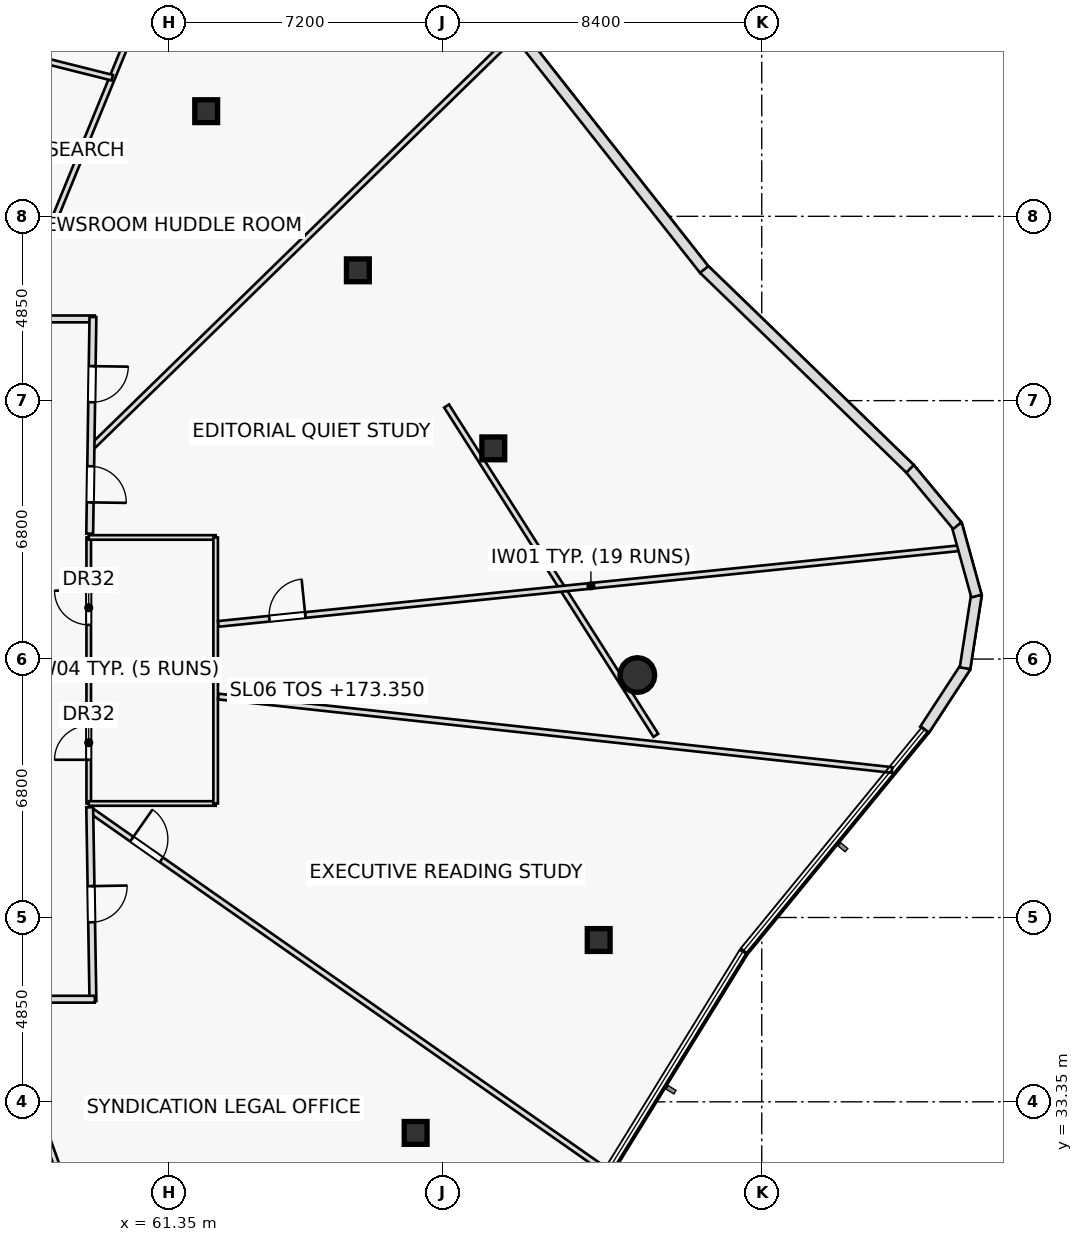
"""IFC4 building model, lengths in metres.
Left out: names, types, materials, properties, quantities, classifications, styles, units other than length and angle.
Written with IfcOpenShell. Run it as: python <this file> out.ifc"""

import sys

from ifc_helpers import new_model, si_unit, direction, frame, frame_2d, origin, origin_2d, place, context, subcontext, project, spatial, rectangle, hollow_rectangle, hollow_circle, extrude, element, fill, save


model = new_model("IFC4")
c1 = context("Model", 3, precision=1e-05, world=origin(), true_north=direction((0.0, 1.0)))
c2 = subcontext(c1, "Body", "Model", "MODEL_VIEW")
j1 = project(units=[si_unit("LENGTHUNIT", "METRE"), si_unit("PLANEANGLEUNIT", "RADIAN")], contexts=[c1])
p1 = place(None, origin())
s1 = spatial("IfcSite", under=j1, at=p1, CompositionType="ELEMENT")
p2 = place(p1, origin())
s2 = spatial("IfcBuilding", under=s1, at=p2, CompositionType="ELEMENT")
p3 = place(p2, frame((0.0, 0.0, 173.35)))
s3 = spatial("IfcBuildingStorey", under=s2, at=p3, CompositionType="ELEMENT", Elevation=173.35)
for number, where, z_axis, x_axis in (
    (1, (67.842, 32.532, 0.0), (0.0, 0.0, 1.0), (1.0, 0.0, 0.0)),
    (2, (72.659, 37.607, 0.0), (0.0, 0.0, 1.0), (1.0, 0.0, 0.0)),
):
    element("IfcColumn", number, at=place(p3, frame(where, z_axis=z_axis, x_axis=x_axis)), inside=s3, PredefinedType="COLUMN", context=c2, shape_type="SweptSolid", body=[
        extrude(hollow_rectangle(XDim=0.6, YDim=0.6, WallThickness=0.036, at=origin_2d()), origin(), (0.0, 0.0, 1.0), 3.55),
    ])
p4 = place(p3, frame((73.676, 44.58, 0.0), z_axis=(0.0, 0.0, 1.0), x_axis=(1.0, 0.0, 0.0)))
e3 = element("IfcColumn", 3, at=p4, inside=s3, PredefinedType="COLUMN", context=c2, shape_type="SweptSolid", body=[
    extrude(hollow_circle(Radius=0.457, WallThickness=0.04, at=origin_2d()), origin(), (0.0, 0.0, 1.0), 3.55),
])
for number, where, z_axis, x_axis in (
    (4, (69.886, 50.544, 0.0), (0.0, 0.0, 1.0), (1.0, 0.0, 0.0)),
    (5, (66.322, 55.229, 0.0), (0.0, 0.0, 1.0), (1.0, 0.0, 0.0)),
    (6, (62.331, 59.416, 0.0), (0.0, 0.0, 1.0), (1.0, 0.0, 0.0)),
):
    element("IfcColumn", number, at=place(p3, frame(where, z_axis=z_axis, x_axis=x_axis)), inside=s3, PredefinedType="COLUMN", context=c2, shape_type="SweptSolid", body=[
        extrude(hollow_rectangle(XDim=0.6, YDim=0.6, WallThickness=0.036, at=origin_2d()), origin(), (0.0, 0.0, 1.0), 3.55),
    ])
p5 = place(p3, frame((74.163, 42.993, 0.0), z_axis=(0.0, 0.0, 1.0), x_axis=(-0.53628142437, 0.844039237166, 0.0)))
e7 = element("IfcWall", 7, at=p5, inside=s3, PredefinedType="PARTITIONING", context=c2, shape_type="SweptSolid", body=[
    extrude(rectangle(XDim=10.267, YDim=0.15, at=frame_2d((5.133, 0.0))), origin(), (0.0, 0.0, 1.0), 2.935),
])
p6 = place(p3, frame((59.24, 41.2, 0.0), z_axis=(0.0, 0.0, 1.0), x_axis=(0.0, 1.0, 0.0)))
e8 = element("IfcWall", 8, at=p6, inside=s3, PredefinedType="PARTITIONING", context=c2, shape_type="SweptSolid", body=[
    extrude(rectangle(XDim=7.0, YDim=0.12, at=frame_2d((3.5, 0.0))), origin(), (0.0, 0.0, 1.0), 3.55),
])
p7 = place(p6, frame((1.15, 0.0, 0.0)))
e9 = element("IfcOpeningElement", 9, at=p7, cuts=e8, PredefinedType="OPENING", context=c2, shape_type="SweptSolid", body=[
    extrude(rectangle(XDim=0.9, YDim=2.05, at=frame_2d((0.45, 1.025))), frame((0.0, 0.07, 0.0), z_axis=(0.0, -1.0, 0.0), x_axis=(1.0, 0.0, 0.0)), (0.0, 0.0, 1.0), 0.14),
])
p8 = place(p6, frame((4.7, 0.0, 0.0)))
e10 = element("IfcOpeningElement", 10, at=p8, cuts=e8, PredefinedType="OPENING", context=c2, shape_type="SweptSolid", body=[
    extrude(rectangle(XDim=0.9, YDim=2.05, at=frame_2d((0.45, 1.025))), frame((0.0, 0.07, 0.0), z_axis=(0.0, -1.0, 0.0), x_axis=(1.0, 0.0, 0.0)), (0.0, 0.0, 1.0), 0.14),
])
for number, where, z_axis, x_axis in (
    (11, (59.24, 41.2, 0.0), (0.0, 0.0, 1.0), (1.0, 0.0, 0.0)),
    (12, (59.24, 44.65, 0.0), (0.0, 0.0, 1.0), (1.0, 0.0, 0.0)),
    (13, (59.24, 48.2, 0.0), (0.0, 0.0, 1.0), (1.0, 0.0, 0.0)),
):
    element("IfcWall", number, at=place(p3, frame(where, z_axis=z_axis, x_axis=x_axis)), inside=s3, PredefinedType="PARTITIONING", context=c2, shape_type="SweptSolid", body=[
        extrude(rectangle(XDim=3.34, YDim=0.12, at=frame_2d((1.67, 0.0))), origin(), (0.0, 0.0, 1.0), 3.55),
    ])
p9 = place(p3, frame((62.58, 41.2, 0.0), z_axis=(0.0, 0.0, 1.0), x_axis=(0.0, 1.0, 0.0)))
e14 = element("IfcWall", 14, at=p9, inside=s3, PredefinedType="PARTITIONING", context=c2, shape_type="SweptSolid", body=[
    extrude(rectangle(XDim=7.0, YDim=0.12, at=frame_2d((3.5, 0.0))), origin(), (0.0, 0.0, 1.0), 3.55),
])
p10 = place(p3, frame((56.824, 36.05, 0.0), z_axis=(0.0, 0.0, 1.0), x_axis=(0.338931579685, -0.940811024751, 0.0)))
e15 = element("IfcWall", 15, at=p10, inside=s3, PredefinedType="PARTITIONING", context=c2, shape_type="SweptSolid", body=[
    extrude(rectangle(XDim=13.694, YDim=0.15, at=frame_2d((6.847, 0.0))), origin(), (0.0, 0.0, 1.0), 2.935),
])
p11 = place(p3, frame((59.267, 41.037, 0.0), z_axis=(0.0, 0.0, 1.0), x_axis=(0.81945399116, -0.573144969769, 0.0)))
e16 = element("IfcWall", 16, at=p11, inside=s3, PredefinedType="PARTITIONING", context=c2, shape_type="SweptSolid", body=[
    extrude(rectangle(XDim=16.626, YDim=0.15, at=frame_2d((8.313, 0.0))), origin(), (0.0, 0.0, 1.0), 2.935),
])
p12 = place(p11, frame((1.35, 0.0, 0.0)))
e17 = element("IfcOpeningElement", 17, at=p12, cuts=e16, PredefinedType="OPENING", context=c2, shape_type="SweptSolid", body=[
    extrude(rectangle(XDim=0.95, YDim=2.05, at=frame_2d((0.475, 1.025))), frame((0.0, 0.085, 0.0), z_axis=(0.0, -1.0, 0.0), x_axis=(1.0, 0.0, 0.0)), (0.0, 0.0, 1.0), 0.17),
])
p13 = place(p3, frame((62.65, 44.014, 0.0), z_axis=(0.0, 0.0, 1.0), x_axis=(0.994111645725, -0.108360674754, 0.0)))
e18 = element("IfcWall", 18, at=p13, inside=s3, PredefinedType="PARTITIONING", context=c2, shape_type="SweptSolid", body=[
    extrude(rectangle(XDim=17.833, YDim=0.15, at=frame_2d((8.917, 0.0))), origin(), (0.0, 0.0, 1.0), 2.935),
])
p14 = place(p3, frame((62.65, 45.925, 0.0), z_axis=(0.0, 0.0, 1.0), x_axis=(0.994817894864, 0.10167278917, 0.0)))
e19 = element("IfcWall", 19, at=p14, inside=s3, PredefinedType="PARTITIONING", context=c2, shape_type="SweptSolid", body=[
    extrude(rectangle(XDim=19.712, YDim=0.15, at=frame_2d((9.856, 0.0))), origin(), (0.0, 0.0, 1.0), 3.025),
])
p15 = place(p14, frame((1.35, 0.0, 0.0)))
e20 = element("IfcOpeningElement", 20, at=p15, cuts=e19, PredefinedType="OPENING", context=c2, shape_type="SweptSolid", body=[
    extrude(rectangle(XDim=0.95, YDim=2.05, at=frame_2d((0.475, 1.025))), frame((0.0, 0.085, 0.0), z_axis=(0.0, -1.0, 0.0), x_axis=(1.0, 0.0, 0.0)), (0.0, 0.0, 1.0), 0.17),
])
p16 = place(p3, frame((59.299, 50.556, 0.0), z_axis=(0.0, 0.0, 1.0), x_axis=(0.716060673245, 0.698038044975, 0.0)))
e21 = element("IfcWall", 21, at=p16, inside=s3, PredefinedType="PARTITIONING", context=c2, shape_type="SweptSolid", body=[
    extrude(rectangle(XDim=15.673, YDim=0.15, at=frame_2d((7.836, 0.0))), origin(), (0.0, 0.0, 1.0), 2.935),
])
p17 = place(p3, frame((57.262, 53.95, 0.0), z_axis=(0.0, 0.0, 1.0), x_axis=(0.378711423927, 0.925514806682, 0.0)))
e22 = element("IfcWall", 22, at=p17, inside=s3, PredefinedType="PARTITIONING", context=c2, shape_type="SweptSolid", body=[
    extrude(rectangle(XDim=13.187, YDim=0.15, at=frame_2d((6.593, 0.0))), origin(), (0.0, 0.0, 1.0), 3.025),
])
p18 = place(p3, frame((59.859, 60.296, 0.0), z_axis=(0.0, 0.0, 1.0), x_axis=(-0.969866322162, 0.243637675935, 0.0)))
e23 = element("IfcWall", 23, at=p18, inside=s3, PredefinedType="PARTITIONING", context=c2, shape_type="SweptSolid", body=[
    extrude(rectangle(XDim=4.899, YDim=0.15, at=frame_2d((2.45, 0.0))), origin(), (0.0, 0.0, 1.0), 2.935),
])
p19 = place(p18, frame((1.975, 0.0, 0.0)))
e24 = element("IfcOpeningElement", 24, at=p19, cuts=e23, PredefinedType="OPENING", context=c2, shape_type="SweptSolid", body=[
    extrude(rectangle(XDim=0.95, YDim=2.05, at=frame_2d((0.475, 1.025))), frame((0.0, 0.085, 0.0), z_axis=(0.0, -1.0, 0.0), x_axis=(1.0, 0.0, 0.0)), (0.0, 0.0, 1.0), 0.17),
])
p20 = place(p3, frame((54.3, 53.95, 0.0), z_axis=(0.0, 0.0, 1.0), x_axis=(1.0, 0.0, 0.0)))
e25 = element("IfcWall", 25, at=p20, inside=s3, PredefinedType="PARTITIONING", context=c2, shape_type="SweptSolid", body=[
    extrude(rectangle(XDim=5.1, YDim=0.18, at=frame_2d((2.55, 0.0))), origin(), (0.0, 0.0, 1.0), 2.935),
])
p21 = place(p20, frame((1.142, 0.0, 0.0)))
e26 = element("IfcOpeningElement", 26, at=p21, cuts=e25, PredefinedType="OPENING", context=c2, shape_type="SweptSolid", body=[
    extrude(rectangle(XDim=0.95, YDim=2.05, at=frame_2d((0.475, 1.025))), frame((0.0, 0.1, 0.0), z_axis=(0.0, -1.0, 0.0), x_axis=(1.0, 0.0, 0.0)), (0.0, 0.0, 1.0), 0.2),
])
p22 = place(p3, frame((59.351, 54.0, 0.0), z_axis=(0.0, 0.0, 1.0), x_axis=(-0.014903899768, -0.999888930718, 0.0)))
e27 = element("IfcWall", 27, at=p22, inside=s3, PredefinedType="PARTITIONING", context=c2, shape_type="SweptSolid", body=[
    extrude(rectangle(XDim=5.701, YDim=0.18, at=frame_2d((2.85, 0.0))), origin(), (0.0, 0.0, 1.0), 2.935),
])
p23 = place(p22, frame((1.292, 0.0, 0.0)))
e28 = element("IfcOpeningElement", 28, at=p23, cuts=e27, PredefinedType="OPENING", context=c2, shape_type="SweptSolid", body=[
    extrude(rectangle(XDim=0.95, YDim=2.05, at=frame_2d((0.475, 1.025))), frame((0.0, 0.1, 0.0), z_axis=(0.0, -1.0, 0.0), x_axis=(1.0, 0.0, 0.0)), (0.0, 0.0, 1.0), 0.2),
])
p24 = place(p22, frame((3.927, 0.0, 0.0)))
e29 = element("IfcOpeningElement", 29, at=p24, cuts=e27, PredefinedType="OPENING", context=c2, shape_type="SweptSolid", body=[
    extrude(rectangle(XDim=0.95, YDim=2.05, at=frame_2d((0.475, 1.025))), frame((0.0, 0.1, 0.0), z_axis=(0.0, -1.0, 0.0), x_axis=(1.0, 0.0, 0.0)), (0.0, 0.0, 1.0), 0.2),
])
p25 = place(p3, frame((59.266, 41.1, 0.0), z_axis=(0.0, 0.0, 1.0), x_axis=(0.016656377357, -0.999861272924, 0.0)))
e30 = element("IfcWall", 30, at=p25, inside=s3, PredefinedType="PARTITIONING", context=c2, shape_type="SweptSolid", body=[
    extrude(rectangle(XDim=5.101, YDim=0.18, at=frame_2d((2.55, 0.0))), origin(), (0.0, 0.0, 1.0), 2.935),
])
p26 = place(p25, frame((2.075, 0.0, 0.0)))
e31 = element("IfcOpeningElement", 31, at=p26, cuts=e30, PredefinedType="OPENING", context=c2, shape_type="SweptSolid", body=[
    extrude(rectangle(XDim=0.95, YDim=2.05, at=frame_2d((0.475, 1.025))), frame((0.0, 0.1, 0.0), z_axis=(0.0, -1.0, 0.0), x_axis=(1.0, 0.0, 0.0)), (0.0, 0.0, 1.0), 0.2),
])
p27 = place(p3, frame((59.4, 36.05, 0.0), z_axis=(0.0, 0.0, 1.0), x_axis=(-1.0, 0.0, 0.0)))
e32 = element("IfcWall", 32, at=p27, inside=s3, PredefinedType="PARTITIONING", context=c2, shape_type="SweptSolid", body=[
    extrude(rectangle(XDim=19.65, YDim=0.18, at=frame_2d((9.825, 0.0))), origin(), (0.0, 0.0, 1.0), 2.935),
])
p28 = place(p27, frame((3.374, 0.0, 0.0)))
e33 = element("IfcOpeningElement", 33, at=p28, cuts=e32, PredefinedType="OPENING", context=c2, shape_type="SweptSolid", body=[
    extrude(rectangle(XDim=0.95, YDim=2.05, at=frame_2d((0.475, 1.025))), frame((0.0, 0.1, 0.0), z_axis=(0.0, -1.0, 0.0), x_axis=(1.0, 0.0, 0.0)), (0.0, 0.0, 1.0), 0.2),
])
p29 = place(p27, frame((7.369, 0.0, 0.0)))
e34 = element("IfcOpeningElement", 34, at=p29, cuts=e32, PredefinedType="OPENING", context=c2, shape_type="SweptSolid", body=[
    extrude(rectangle(XDim=0.95, YDim=2.05, at=frame_2d((0.475, 1.025))), frame((0.0, 0.1, 0.0), z_axis=(0.0, -1.0, 0.0), x_axis=(1.0, 0.0, 0.0)), (0.0, 0.0, 1.0), 0.2),
])
p30 = place(p27, frame((13.957, 0.0, 0.0)))
e35 = element("IfcOpeningElement", 35, at=p30, cuts=e32, PredefinedType="OPENING", context=c2, shape_type="SweptSolid", body=[
    extrude(rectangle(XDim=0.95, YDim=2.05, at=frame_2d((0.475, 1.025))), frame((0.0, 0.1, 0.0), z_axis=(0.0, -1.0, 0.0), x_axis=(1.0, 0.0, 0.0)), (0.0, 0.0, 1.0), 0.2),
])
p31 = place(p3, frame((81.236, 43.145, 0.0), z_axis=(0.0, 0.0, 1.0), x_axis=(0.546806704475, 0.837258877493, 0.0)))
e36 = element("IfcWall", 36, at=p31, inside=s3, PredefinedType="STANDARD", context=c2, shape_type="SweptSolid", body=[
    extrude(rectangle(XDim=1.962, YDim=0.28, at=frame_2d((0.981, 0.0))), origin(), (0.0, 0.0, 1.0), 3.55),
])
for number, where, z_axis, x_axis in (
    (37, (82.299, 44.76, 0.0), (0.0, 0.0, 1.0), (0.154, 0.988, 0.0)),
    (38, (82.6, 46.657, 0.0), (0.0, 0.0, 1.0), (-0.266, 0.964, 0.0)),
):
    element("IfcWall", number, at=place(p3, frame(where, z_axis=z_axis, x_axis=x_axis)), inside=s3, PredefinedType="STANDARD", context=c2, shape_type="SweptSolid", body=[
        extrude(rectangle(XDim=1.95, YDim=0.28, at=frame_2d((0.975, 0.0))), origin(), (0.0, 0.0, 1.0), 3.55),
    ])
p32 = place(p3, frame((82.094, 48.511, 0.0), z_axis=(0.0, 0.0, 1.0), x_axis=(-0.639417235274, 0.768859934731, 0.0)))
e39 = element("IfcWall", 39, at=p32, inside=s3, PredefinedType="STANDARD", context=c2, shape_type="SweptSolid", body=[
    extrude(rectangle(XDim=1.973, YDim=0.28, at=frame_2d((0.986, 0.0))), origin(), (0.0, 0.0, 1.0), 3.55),
])
p33 = place(p3, frame((80.854, 50.006, 0.0), z_axis=(0.0, 0.0, 1.0), x_axis=(-0.718431079441, 0.695598148425, 0.0)))
e40 = element("IfcWall", 40, at=p33, inside=s3, PredefinedType="STANDARD", context=c2, shape_type="SweptSolid", body=[
    extrude(rectangle(XDim=7.57, YDim=0.28, at=frame_2d((3.785, 0.0))), origin(), (0.0, 0.0, 1.0), 3.55),
])
p34 = place(p3, frame((75.435, 55.25, 0.0), z_axis=(0.0, 0.0, 1.0), x_axis=(-0.619172220284, 0.785255220695, 0.0)))
e41 = element("IfcWall", 41, at=p34, inside=s3, PredefinedType="STANDARD", context=c2, shape_type="SweptSolid", body=[
    extrude(rectangle(XDim=8.185, YDim=0.28, at=frame_2d((4.092, 0.0))), origin(), (0.0, 0.0, 1.0), 3.55),
])
p35 = place(p7, origin())
e42 = element("IfcDoor", 42, at=p35, inside=s3, OperationType="SINGLE_SWING_LEFT", PredefinedType="DOOR", context=c2, shape_type="SweptSolid", body=[
    extrude(rectangle(XDim=0.9, YDim=2.05, at=frame_2d((0.45, 1.025))), frame((0.0, 0.025, 0.0), z_axis=(0.0, -1.0, 0.0), x_axis=(1.0, 0.0, 0.0)), (0.0, 0.0, 1.0), 0.05),
])
fill(e9, e42)
p36 = place(p8, origin())
e43 = element("IfcDoor", 43, at=p36, inside=s3, OperationType="SINGLE_SWING_RIGHT", PredefinedType="DOOR", context=c2, shape_type="SweptSolid", body=[
    extrude(rectangle(XDim=0.9, YDim=2.05, at=frame_2d((0.45, 1.025))), frame((0.0, 0.025, 0.0), z_axis=(0.0, -1.0, 0.0), x_axis=(1.0, 0.0, 0.0)), (0.0, 0.0, 1.0), 0.05),
])
fill(e10, e43)
p37 = place(p12, origin())
e44 = element("IfcDoor", 44, at=p37, inside=s3, OperationType="SINGLE_SWING_LEFT", PredefinedType="DOOR", context=c2, shape_type="SweptSolid", body=[
    extrude(rectangle(XDim=0.95, YDim=2.05, at=frame_2d((0.475, 1.025))), frame((0.0, 0.025, 0.0), z_axis=(0.0, -1.0, 0.0), x_axis=(1.0, 0.0, 0.0)), (0.0, 0.0, 1.0), 0.05),
])
fill(e17, e44)
p38 = place(p15, origin())
e45 = element("IfcDoor", 45, at=p38, inside=s3, OperationType="SINGLE_SWING_RIGHT", PredefinedType="DOOR", context=c2, shape_type="SweptSolid", body=[
    extrude(rectangle(XDim=0.95, YDim=2.05, at=frame_2d((0.475, 1.025))), frame((0.0, 0.025, 0.0), z_axis=(0.0, -1.0, 0.0), x_axis=(1.0, 0.0, 0.0)), (0.0, 0.0, 1.0), 0.05),
])
fill(e20, e45)
p39 = place(p23, origin())
e46 = element("IfcDoor", 46, at=p39, inside=s3, OperationType="SINGLE_SWING_LEFT", PredefinedType="DOOR", context=c2, shape_type="SweptSolid", body=[
    extrude(rectangle(XDim=0.95, YDim=2.05, at=frame_2d((0.475, 1.025))), frame((0.0, 0.025, 0.0), z_axis=(0.0, -1.0, 0.0), x_axis=(1.0, 0.0, 0.0)), (0.0, 0.0, 1.0), 0.05),
])
fill(e28, e46)
p40 = place(p24, origin())
e47 = element("IfcDoor", 47, at=p40, inside=s3, OperationType="SINGLE_SWING_RIGHT", PredefinedType="DOOR", context=c2, shape_type="SweptSolid", body=[
    extrude(rectangle(XDim=0.95, YDim=2.05, at=frame_2d((0.475, 1.025))), frame((0.0, 0.025, 0.0), z_axis=(0.0, -1.0, 0.0), x_axis=(1.0, 0.0, 0.0)), (0.0, 0.0, 1.0), 0.05),
])
fill(e29, e47)
p41 = place(p26, origin())
e48 = element("IfcDoor", 48, at=p41, inside=s3, OperationType="SINGLE_SWING_LEFT", PredefinedType="DOOR", context=c2, shape_type="SweptSolid", body=[
    extrude(rectangle(XDim=0.95, YDim=2.05, at=frame_2d((0.475, 1.025))), frame((0.0, 0.025, 0.0), z_axis=(0.0, -1.0, 0.0), x_axis=(1.0, 0.0, 0.0)), (0.0, 0.0, 1.0), 0.05),
])
fill(e31, e48)
save(model, sys.argv[1])
